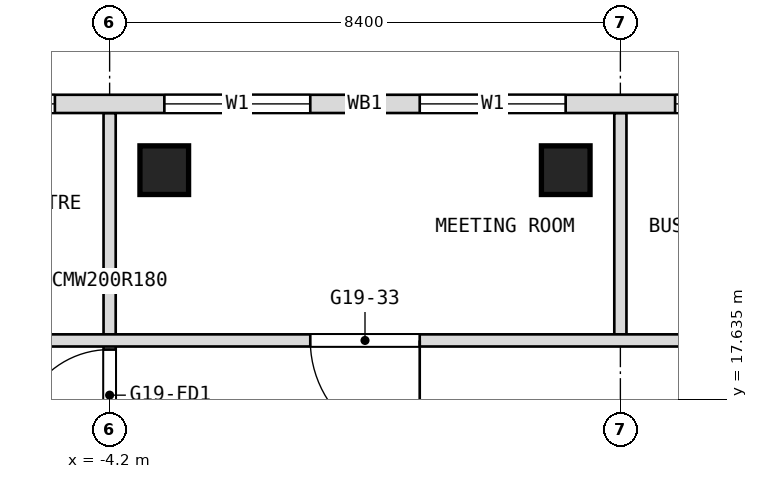
"""IFC4 building model, lengths in metres.
Left out: names, types, materials, properties, quantities, classifications, styles, units other than length and angle.
Written with IfcOpenShell. Run it as: python <this file> out.ifc"""

import sys

from ifc_helpers import new_model, si_unit, direction, frame, frame_2d, origin, origin_2d, place, context, subcontext, project, spatial, rectangle, extrude, element, fill, save


model = new_model("IFC4")
c1 = context("Model", 3, precision=1e-05, world=origin(), true_north=direction((0.0, 1.0)))
c2 = subcontext(c1, "Body", "Model", "MODEL_VIEW")
j1 = project(units=[si_unit("LENGTHUNIT", "METRE"), si_unit("PLANEANGLEUNIT", "RADIAN")], contexts=[c1])
p1 = place(None, origin())
s1 = spatial("IfcSite", under=j1, at=p1, CompositionType="ELEMENT")
p2 = place(p1, origin())
s2 = spatial("IfcBuilding", under=s1, at=p2, CompositionType="ELEMENT")
p3 = place(p2, frame((0.0, 0.0, 227.3)))
s3 = spatial("IfcBuildingStorey", under=s2, at=p3, CompositionType="ELEMENT", Elevation=227.3)
for number, where, z_axis, x_axis in (
    (1, (-3.302, 21.4, 0.0), (0.0, 0.0, 1.0), (1.0, 0.0, 0.0)),
    (2, (3.302, 21.4, 0.0), (0.0, 0.0, 1.0), (1.0, 0.0, 0.0)),
):
    element("IfcColumn", number, at=place(p3, frame(where, z_axis=z_axis, x_axis=x_axis)), inside=s3, PredefinedType="COLUMN", context=c2, shape_type="SweptSolid", body=[
        extrude(rectangle(XDim=0.8, YDim=0.8, at=origin_2d()), origin(), (0.0, 0.0, 1.0), 3.6),
    ])
p4 = place(p3, frame((4.2, 18.7, 0.0), z_axis=(0.0, 0.0, 1.0), x_axis=(0.0, 1.0, 0.0)))
e3 = element("IfcWall", 3, at=p4, inside=s3, PredefinedType="PARTITIONING", context=c2, shape_type="SweptSolid", body=[
    extrude(rectangle(XDim=3.64, YDim=0.2, at=frame_2d((1.82, 0.0))), origin(), (0.0, 0.0, 1.0), 3.34),
])
p5 = place(p3, frame((-4.2, 16.8, 0.0), z_axis=(0.0, 0.0, 1.0), x_axis=(0.0, 1.0, 0.0)))
e4 = element("IfcWall", 4, at=p5, inside=s3, PredefinedType="PARTITIONING", context=c2, shape_type="SweptSolid", body=[
    extrude(rectangle(XDim=5.54, YDim=0.2, at=frame_2d((2.77, 0.0))), origin(), (0.0, 0.0, 1.0), 3.34),
])
p6 = place(p5, frame((0.15, 0.0, 0.0)))
e5 = element("IfcOpeningElement", 5, at=p6, cuts=e4, PredefinedType="OPENING", context=c2, shape_type="SweptSolid", body=[
    extrude(rectangle(XDim=1.5, YDim=2.1, at=frame_2d((0.75, 1.05))), frame((0.0, 0.1, 0.0), z_axis=(0.0, -1.0, 0.0), x_axis=(1.0, 0.0, 0.0)), (0.0, 0.0, 1.0), 0.2),
])
p7 = place(p3, frame((-16.9, 18.6, 0.0), z_axis=(0.0, 0.0, 1.0), x_axis=(1.0, 0.0, 0.0)))
e6 = element("IfcWall", 6, at=p7, inside=s3, PredefinedType="PARTITIONING", context=c2, shape_type="SweptSolid", body=[
    extrude(rectangle(XDim=33.8, YDim=0.2, at=frame_2d((16.9, 0.0))), origin(), (0.0, 0.0, 1.0), 3.34),
])
p8 = place(p7, frame((1.7, 0.0, 0.0)))
e7 = element("IfcOpeningElement", 7, at=p8, cuts=e6, PredefinedType="OPENING", context=c2, shape_type="SweptSolid", body=[
    extrude(rectangle(XDim=1.0, YDim=2.1, at=frame_2d((0.5, 1.05))), frame((0.0, 0.1, 0.0), z_axis=(0.0, -1.0, 0.0), x_axis=(1.0, 0.0, 0.0)), (0.0, 0.0, 1.0), 0.2),
])
p9 = place(p7, frame((7.6, 0.0, 0.0)))
e8 = element("IfcOpeningElement", 8, at=p9, cuts=e6, PredefinedType="OPENING", context=c2, shape_type="SweptSolid", body=[
    extrude(rectangle(XDim=1.8, YDim=2.1, at=frame_2d((0.9, 1.05))), frame((0.0, 0.1, 0.0), z_axis=(0.0, -1.0, 0.0), x_axis=(1.0, 0.0, 0.0)), (0.0, 0.0, 1.0), 0.2),
])
p10 = place(p7, frame((16.0, 0.0, 0.0)))
e9 = element("IfcOpeningElement", 9, at=p10, cuts=e6, PredefinedType="OPENING", context=c2, shape_type="SweptSolid", body=[
    extrude(rectangle(XDim=1.8, YDim=2.1, at=frame_2d((0.9, 1.05))), frame((0.0, 0.1, 0.0), z_axis=(0.0, -1.0, 0.0), x_axis=(1.0, 0.0, 0.0)), (0.0, 0.0, 1.0), 0.2),
])
p11 = place(p7, frame((24.4, 0.0, 0.0)))
e10 = element("IfcOpeningElement", 10, at=p11, cuts=e6, PredefinedType="OPENING", context=c2, shape_type="SweptSolid", body=[
    extrude(rectangle(XDim=1.8, YDim=2.1, at=frame_2d((0.9, 1.05))), frame((0.0, 0.1, 0.0), z_axis=(0.0, -1.0, 0.0), x_axis=(1.0, 0.0, 0.0)), (0.0, 0.0, 1.0), 0.2),
])
p12 = place(p7, frame((31.1, 0.0, 0.0)))
e11 = element("IfcOpeningElement", 11, at=p12, cuts=e6, PredefinedType="OPENING", context=c2, shape_type="SweptSolid", body=[
    extrude(rectangle(XDim=1.0, YDim=2.1, at=frame_2d((0.5, 1.05))), frame((0.0, 0.1, 0.0), z_axis=(0.0, -1.0, 0.0), x_axis=(1.0, 0.0, 0.0)), (0.0, 0.0, 1.0), 0.2),
])
p13 = place(p3, frame((19.206, 22.49, 0.0), z_axis=(0.0, 0.0, 1.0), x_axis=(-1.0, 0.0, 0.0)))
e12 = element("IfcWall", 12, at=p13, inside=s3, PredefinedType="NOTDEFINED", context=c2, shape_type="SweptSolid", body=[
    extrude(rectangle(XDim=38.412, YDim=0.3, at=frame_2d((19.206, 0.0))), origin(), (0.0, 0.0, 1.0), 3.6),
])
p14 = place(p13, frame((3.306, 0.0, 0.9)))
e13 = element("IfcOpeningElement", 13, at=p14, cuts=e12, PredefinedType="OPENING", context=c2, shape_type="SweptSolid", body=[
    extrude(rectangle(XDim=2.4, YDim=2.1, at=frame_2d((1.2, 1.05))), frame((0.0, 0.15, 0.0), z_axis=(0.0, -1.0, 0.0), x_axis=(1.0, 0.0, 0.0)), (0.0, 0.0, 1.0), 0.3),
])
p15 = place(p13, frame((7.506, 0.0, 0.9)))
e14 = element("IfcOpeningElement", 14, at=p15, cuts=e12, PredefinedType="OPENING", context=c2, shape_type="SweptSolid", body=[
    extrude(rectangle(XDim=2.4, YDim=2.1, at=frame_2d((1.2, 1.05))), frame((0.0, 0.15, 0.0), z_axis=(0.0, -1.0, 0.0), x_axis=(1.0, 0.0, 0.0)), (0.0, 0.0, 1.0), 0.3),
])
p16 = place(p13, frame((11.706, 0.0, 0.9)))
e15 = element("IfcOpeningElement", 15, at=p16, cuts=e12, PredefinedType="OPENING", context=c2, shape_type="SweptSolid", body=[
    extrude(rectangle(XDim=2.4, YDim=2.1, at=frame_2d((1.2, 1.05))), frame((0.0, 0.15, 0.0), z_axis=(0.0, -1.0, 0.0), x_axis=(1.0, 0.0, 0.0)), (0.0, 0.0, 1.0), 0.3),
])
p17 = place(p13, frame((15.906, 0.0, 0.9)))
e16 = element("IfcOpeningElement", 16, at=p17, cuts=e12, PredefinedType="OPENING", context=c2, shape_type="SweptSolid", body=[
    extrude(rectangle(XDim=2.4, YDim=2.1, at=frame_2d((1.2, 1.05))), frame((0.0, 0.15, 0.0), z_axis=(0.0, -1.0, 0.0), x_axis=(1.0, 0.0, 0.0)), (0.0, 0.0, 1.0), 0.3),
])
p18 = place(p13, frame((20.106, 0.0, 0.9)))
e17 = element("IfcOpeningElement", 17, at=p18, cuts=e12, PredefinedType="OPENING", context=c2, shape_type="SweptSolid", body=[
    extrude(rectangle(XDim=2.4, YDim=2.1, at=frame_2d((1.2, 1.05))), frame((0.0, 0.15, 0.0), z_axis=(0.0, -1.0, 0.0), x_axis=(1.0, 0.0, 0.0)), (0.0, 0.0, 1.0), 0.3),
])
p19 = place(p13, frame((24.306, 0.0, 0.9)))
e18 = element("IfcOpeningElement", 18, at=p19, cuts=e12, PredefinedType="OPENING", context=c2, shape_type="SweptSolid", body=[
    extrude(rectangle(XDim=2.4, YDim=2.1, at=frame_2d((1.2, 1.05))), frame((0.0, 0.15, 0.0), z_axis=(0.0, -1.0, 0.0), x_axis=(1.0, 0.0, 0.0)), (0.0, 0.0, 1.0), 0.3),
])
p20 = place(p13, frame((28.506, 0.0, 0.9)))
e19 = element("IfcOpeningElement", 19, at=p20, cuts=e12, PredefinedType="OPENING", context=c2, shape_type="SweptSolid", body=[
    extrude(rectangle(XDim=2.4, YDim=2.1, at=frame_2d((1.2, 1.05))), frame((0.0, 0.15, 0.0), z_axis=(0.0, -1.0, 0.0), x_axis=(1.0, 0.0, 0.0)), (0.0, 0.0, 1.0), 0.3),
])
p21 = place(p13, frame((32.706, 0.0, 0.9)))
e20 = element("IfcOpeningElement", 20, at=p21, cuts=e12, PredefinedType="OPENING", context=c2, shape_type="SweptSolid", body=[
    extrude(rectangle(XDim=2.4, YDim=2.1, at=frame_2d((1.2, 1.05))), frame((0.0, 0.15, 0.0), z_axis=(0.0, -1.0, 0.0), x_axis=(1.0, 0.0, 0.0)), (0.0, 0.0, 1.0), 0.3),
])
p22 = place(p10, origin())
e21 = element("IfcDoor", 21, at=p22, inside=s3, OperationType="DOUBLE_DOOR_SINGLE_SWING", PredefinedType="DOOR", context=c2, shape_type="SweptSolid", body=[
    extrude(rectangle(XDim=1.8, YDim=2.1, at=frame_2d((0.9, 1.05))), frame((0.0, 0.025, 0.0), z_axis=(0.0, -1.0, 0.0), x_axis=(1.0, 0.0, 0.0)), (0.0, 0.0, 1.0), 0.05),
])
fill(e9, e21)
p23 = place(p16, origin())
e22 = element("IfcWindow", 22, at=p23, inside=s3, PartitioningType="SINGLE_PANEL", PredefinedType="WINDOW", context=c2, shape_type="SweptSolid", body=[
    extrude(rectangle(XDim=2.4, YDim=2.1, at=frame_2d((1.2, 1.05))), frame((0.0, 0.03, 0.0), z_axis=(0.0, -1.0, 0.0), x_axis=(1.0, 0.0, 0.0)), (0.0, 0.0, 1.0), 0.06),
])
fill(e15, e22)
p24 = place(p17, origin())
e23 = element("IfcWindow", 23, at=p24, inside=s3, PartitioningType="SINGLE_PANEL", PredefinedType="WINDOW", context=c2, shape_type="SweptSolid", body=[
    extrude(rectangle(XDim=2.4, YDim=2.1, at=frame_2d((1.2, 1.05))), frame((0.0, 0.03, 0.0), z_axis=(0.0, -1.0, 0.0), x_axis=(1.0, 0.0, 0.0)), (0.0, 0.0, 1.0), 0.06),
])
fill(e16, e23)
p25 = place(p18, origin())
e24 = element("IfcWindow", 24, at=p25, inside=s3, PartitioningType="SINGLE_PANEL", PredefinedType="WINDOW", context=c2, shape_type="SweptSolid", body=[
    extrude(rectangle(XDim=2.4, YDim=2.1, at=frame_2d((1.2, 1.05))), frame((0.0, 0.03, 0.0), z_axis=(0.0, -1.0, 0.0), x_axis=(1.0, 0.0, 0.0)), (0.0, 0.0, 1.0), 0.06),
])
fill(e17, e24)
p26 = place(p19, origin())
e25 = element("IfcWindow", 25, at=p26, inside=s3, PartitioningType="SINGLE_PANEL", PredefinedType="WINDOW", context=c2, shape_type="SweptSolid", body=[
    extrude(rectangle(XDim=2.4, YDim=2.1, at=frame_2d((1.2, 1.05))), frame((0.0, 0.03, 0.0), z_axis=(0.0, -1.0, 0.0), x_axis=(1.0, 0.0, 0.0)), (0.0, 0.0, 1.0), 0.06),
])
fill(e18, e25)
p27 = place(p6, origin())
e26 = element("IfcDoor", 26, at=p27, inside=s3, OperationType="DOUBLE_DOOR_DOUBLE_SWING", PredefinedType="DOOR", context=c2, shape_type="SweptSolid", body=[
    extrude(rectangle(XDim=1.5, YDim=2.1, at=frame_2d((0.75, 1.05))), frame((0.0, 0.025, 0.0), z_axis=(0.0, -1.0, 0.0), x_axis=(1.0, 0.0, 0.0)), (0.0, 0.0, 1.0), 0.05),
])
fill(e5, e26)
save(model, sys.argv[1])
